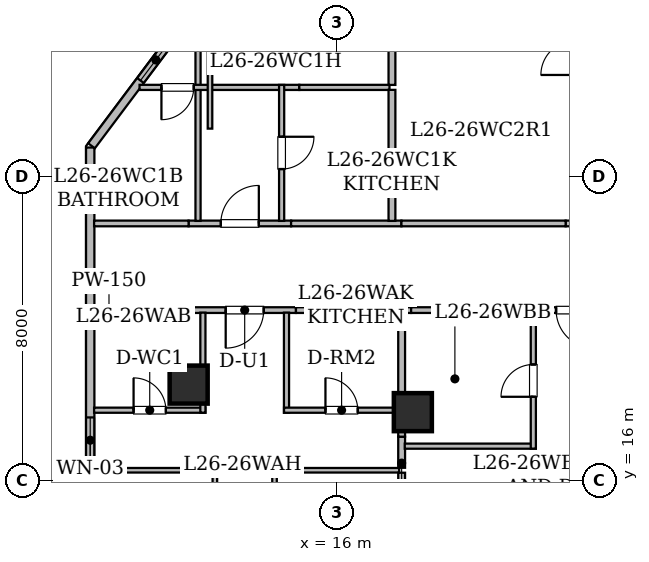
"""IFC4 building model, lengths in metres.
Left out: names, types, materials, properties, quantities, classifications, styles, units other than length and angle.
Written with IfcOpenShell. Run it as: python <this file> out.ifc"""

import sys

from ifc_helpers import new_model, si_unit, direction, frame, frame_2d, origin, origin_2d, place, context, subcontext, project, spatial, rectangle, hollow_rectangle, extrude, element, fill, save


model = new_model("IFC4")
c1 = context("Model", 3, precision=1e-05, world=origin(), true_north=direction((0.0, 1.0)))
c2 = subcontext(c1, "Body", "Model", "MODEL_VIEW")
j1 = project(units=[si_unit("LENGTHUNIT", "METRE"), si_unit("PLANEANGLEUNIT", "RADIAN")], contexts=[c1])
p1 = place(None, origin())
s1 = spatial("IfcSite", under=j1, at=p1, CompositionType="ELEMENT")
p2 = place(p1, origin())
s2 = spatial("IfcBuilding", under=s1, at=p2, CompositionType="ELEMENT")
p3 = place(p2, frame((0.0, 0.0, 105.55)))
s3 = spatial("IfcBuildingStorey", under=s2, at=p3, CompositionType="ELEMENT", Elevation=105.55)
for number, where, z_axis, x_axis in (
    (1, (12.1, 18.525, 0.0), (0.0, 0.0, 1.0), (1.0, 0.0, 0.0)),
    (2, (18.0, 17.8, 0.0), (0.0, 0.0, 1.0), (1.0, 0.0, 0.0)),
):
    element("IfcColumn", number, at=place(p3, frame(where, z_axis=z_axis, x_axis=x_axis)), inside=s3, PredefinedType="COLUMN", context=c2, shape_type="SweptSolid", body=[
        extrude(hollow_rectangle(XDim=1.0, YDim=1.0, WallThickness=0.05, at=origin_2d()), origin(), (0.0, 0.0, 1.0), 3.65),
    ])
p4 = place(p3, frame((9.51, 10.717, 0.0), z_axis=(0.0, 0.0, 1.0), x_axis=(0.0, 1.0, 0.0)))
e3 = element("IfcWall", 3, at=p4, inside=s3, PredefinedType="STANDARD", context=c2, shape_type="SweptSolid", body=[
    extrude(rectangle(XDim=14.046, YDim=0.22, at=frame_2d((7.023, 0.0))), origin(), (0.0, 0.0, 1.0), 3.43),
])
p5 = place(p4, frame((5.744, 0.0, 0.8)))
e4 = element("IfcOpeningElement", 4, at=p5, cuts=e3, PredefinedType="OPENING", context=c2, shape_type="SweptSolid", body=[
    extrude(rectangle(XDim=1.2, YDim=1.5, at=frame_2d((0.6, 0.75))), frame((0.0, 0.12, 0.0), z_axis=(0.0, -1.0, 0.0), x_axis=(1.0, 0.0, 0.0)), (0.0, 0.0, 1.0), 0.24),
])
p6 = place(p4, frame((2.345, 0.0, 0.85)))
e5 = element("IfcOpeningElement", 5, at=p6, cuts=e3, PredefinedType="OPENING", context=c2, shape_type="SweptSolid", body=[
    extrude(rectangle(XDim=1.65, YDim=1.55, at=frame_2d((0.825, 0.775))), frame((0.0, 0.12, 0.0), z_axis=(0.0, -1.0, 0.0), x_axis=(1.0, 0.0, 0.0)), (0.0, 0.0, 1.0), 0.24),
])
p7 = place(p3, frame((9.544, 24.808, 0.0), z_axis=(0.0, 0.0, 1.0), x_axis=(0.600019580308, 0.799985314394, 0.0)))
e6 = element("IfcWall", 6, at=p7, inside=s3, PredefinedType="STANDARD", context=c2, shape_type="SweptSolid", body=[
    extrude(rectangle(XDim=3.99, YDim=0.22, at=frame_2d((1.995, 0.0))), origin(), (0.0, 0.0, 1.0), 3.43),
])
p8 = place(p7, frame((2.147, 0.0, 0.85)))
e7 = element("IfcOpeningElement", 7, at=p8, cuts=e6, PredefinedType="OPENING", context=c2, shape_type="SweptSolid", body=[
    extrude(rectangle(XDim=1.35, YDim=1.5, at=frame_2d((0.675, 0.75))), frame((0.0, 0.12, 0.0), z_axis=(0.0, -1.0, 0.0), x_axis=(1.0, 0.0, 0.0)), (0.0, 0.0, 1.0), 0.24),
])
p9 = place(p3, frame((14.924, 20.485, 0.0), z_axis=(0.0, 0.0, 1.0), x_axis=(-1.0, 0.0, 0.0)))
e8 = element("IfcWall", 8, at=p9, inside=s3, PredefinedType="STANDARD", context=c2, shape_type="SweptSolid", body=[
    extrude(rectangle(XDim=2.698, YDim=0.15, at=frame_2d((1.349, 0.0))), origin(), (0.0, 0.0, 1.0), 3.43),
])
p10 = place(p9, frame((0.849, 0.0, 0.0)))
e9 = element("IfcOpeningElement", 9, at=p10, cuts=e8, PredefinedType="OPENING", context=c2, shape_type="SweptSolid", body=[
    extrude(rectangle(XDim=1.0, YDim=2.15, at=frame_2d((0.5, 1.075))), frame((0.0, 0.085, 0.0), z_axis=(0.0, -1.0, 0.0), x_axis=(1.0, 0.0, 0.0)), (0.0, 0.0, 1.0), 0.17),
])
p11 = place(p3, frame((12.226, 20.485, 0.0), z_axis=(0.0, 0.0, 1.0), x_axis=(-1.0, 0.0, 0.0)))
e10 = element("IfcWall", 10, at=p11, inside=s3, PredefinedType="STANDARD", context=c2, shape_type="SweptSolid", body=[
    extrude(rectangle(XDim=2.614, YDim=0.15, at=frame_2d((1.307, 0.0))), origin(), (0.0, 0.0, 1.0), 2.876),
])
p12 = place(p3, frame((17.954, 20.485, 0.0), z_axis=(0.0, 0.0, 1.0), x_axis=(-1.0, 0.0, 0.0)))
e11 = element("IfcWall", 11, at=p12, inside=s3, PredefinedType="STANDARD", context=c2, shape_type="SweptSolid", body=[
    extrude(rectangle(XDim=3.03, YDim=0.15, at=frame_2d((1.515, 0.0))), origin(), (0.0, 0.0, 1.0), 2.647),
])
p13 = place(p3, frame((23.619, 20.485, 0.0), z_axis=(0.0, 0.0, 1.0), x_axis=(-1.0, 0.0, 0.0)))
e12 = element("IfcWall", 12, at=p13, inside=s3, PredefinedType="STANDARD", context=c2, shape_type="SweptSolid", body=[
    extrude(rectangle(XDim=2.698, YDim=0.15, at=frame_2d((1.349, 0.0))), origin(), (0.0, 0.0, 1.0), 3.43),
])
p14 = place(p13, frame((0.849, 0.0, 0.0)))
e13 = element("IfcOpeningElement", 13, at=p14, cuts=e12, PredefinedType="OPENING", context=c2, shape_type="SweptSolid", body=[
    extrude(rectangle(XDim=1.0, YDim=2.15, at=frame_2d((0.5, 1.075))), frame((0.0, 0.085, 0.0), z_axis=(0.0, -1.0, 0.0), x_axis=(1.0, 0.0, 0.0)), (0.0, 0.0, 1.0), 0.17),
])
p15 = place(p3, frame((20.921, 20.485, 0.0), z_axis=(0.0, 0.0, 1.0), x_axis=(-1.0, 0.0, 0.0)))
e14 = element("IfcWall", 14, at=p15, inside=s3, PredefinedType="STANDARD", context=c2, shape_type="SweptSolid", body=[
    extrude(rectangle(XDim=2.967, YDim=0.15, at=frame_2d((1.483, 0.0))), origin(), (0.0, 0.0, 1.0), 2.647),
])
p16 = place(p3, frame((12.098, 22.765, 0.0), z_axis=(0.0, 0.0, 1.0), x_axis=(1.0, 0.0, 0.0)))
e15 = element("IfcWall", 15, at=p16, inside=s3, PredefinedType="STANDARD", context=c2, shape_type="SweptSolid", body=[
    extrude(rectangle(XDim=2.698, YDim=0.15, at=frame_2d((1.349, 0.0))), origin(), (0.0, 0.0, 1.0), 2.876),
])
p17 = place(p16, frame((0.849, 0.0, 0.0)))
e16 = element("IfcOpeningElement", 16, at=p17, cuts=e15, PredefinedType="OPENING", context=c2, shape_type="SweptSolid", body=[
    extrude(rectangle(XDim=1.0, YDim=2.15, at=frame_2d((0.5, 1.075))), frame((0.0, 0.085, 0.0), z_axis=(0.0, -1.0, 0.0), x_axis=(1.0, 0.0, 0.0)), (0.0, 0.0, 1.0), 0.17),
])
p18 = place(p3, frame((9.612, 22.765, 0.0), z_axis=(0.0, 0.0, 1.0), x_axis=(1.0, 0.0, 0.0)))
e17 = element("IfcWall", 17, at=p18, inside=s3, PredefinedType="STANDARD", context=c2, shape_type="SweptSolid", body=[
    extrude(rectangle(XDim=2.486, YDim=0.15, at=frame_2d((1.243, 0.0))), origin(), (0.0, 0.0, 1.0), 2.876),
])
p19 = place(p3, frame((14.796, 22.765, 0.0), z_axis=(0.0, 0.0, 1.0), x_axis=(1.0, 0.0, 0.0)))
e18 = element("IfcWall", 18, at=p19, inside=s3, PredefinedType="STANDARD", context=c2, shape_type="SweptSolid", body=[
    extrude(rectangle(XDim=2.903, YDim=0.15, at=frame_2d((1.452, 0.0))), origin(), (0.0, 0.0, 1.0), 3.43),
])
p20 = place(p3, frame((22.02, 22.765, 0.0), z_axis=(0.0, 0.0, 1.0), x_axis=(1.0, 0.0, 0.0)))
e19 = element("IfcWall", 19, at=p20, inside=s3, PredefinedType="STANDARD", context=c2, shape_type="SweptSolid", body=[
    extrude(rectangle(XDim=2.078, YDim=0.15, at=frame_2d((1.039, 0.0))), origin(), (0.0, 0.0, 1.0), 3.43),
])
p21 = place(p3, frame((17.699, 22.765, 0.0), z_axis=(0.0, 0.0, 1.0), x_axis=(1.0, 0.0, 0.0)))
e20 = element("IfcWall", 20, at=p21, inside=s3, PredefinedType="STANDARD", context=c2, shape_type="SweptSolid", body=[
    extrude(rectangle(XDim=4.321, YDim=0.15, at=frame_2d((2.161, 0.0))), origin(), (0.0, 0.0, 1.0), 2.647),
])
p22 = place(p3, frame((9.612, 17.851, 0.0), z_axis=(0.0, 0.0, 1.0), x_axis=(1.0, 0.0, 0.0)))
e21 = element("IfcWall", 21, at=p22, inside=s3, PredefinedType="PARTITIONING", context=c2, shape_type="SweptSolid", body=[
    extrude(rectangle(XDim=2.928, YDim=0.135, at=frame_2d((1.464, 0.0))), origin(), (0.0, 0.0, 1.0), 2.876),
])
p23 = place(p22, frame((1.039, 0.0, 0.0)))
e22 = element("IfcOpeningElement", 22, at=p23, cuts=e21, PredefinedType="OPENING", context=c2, shape_type="SweptSolid", body=[
    extrude(rectangle(XDim=0.85, YDim=2.1, at=frame_2d((0.425, 1.05))), frame((0.0, 0.077, 0.0), z_axis=(0.0, -1.0, 0.0), x_axis=(1.0, 0.0, 0.0)), (0.0, 0.0, 1.0), 0.155),
])
for number, where, z_axis, x_axis in (
    (23, (12.475, 17.786, 0.0), (0.0, 0.0, 1.0), (0.0, 1.0, 0.0)),
    (24, (14.675, 20.418, 0.0), (0.0, 0.0, 1.0), (0.0, -1.0, 0.0)),
):
    element("IfcWall", number, at=place(p3, frame(where, z_axis=z_axis, x_axis=x_axis)), inside=s3, PredefinedType="PARTITIONING", context=c2, shape_type="SweptSolid", body=[
        extrude(rectangle(XDim=2.632, YDim=0.135, at=frame_2d((1.316, 0.0))), origin(), (0.0, 0.0, 1.0), 2.647),
    ])
p24 = place(p3, frame((14.61, 17.851, 0.0), z_axis=(0.0, 0.0, 1.0), x_axis=(1.0, 0.0, 0.0)))
e25 = element("IfcWall", 25, at=p24, inside=s3, PredefinedType="PARTITIONING", context=c2, shape_type="SweptSolid", body=[
    extrude(rectangle(XDim=3.03, YDim=0.135, at=frame_2d((1.515, 0.0))), origin(), (0.0, 0.0, 1.0), 2.647),
])
p25 = place(p24, frame((1.09, 0.0, 0.0)))
e26 = element("IfcOpeningElement", 26, at=p25, cuts=e25, PredefinedType="OPENING", context=c2, shape_type="SweptSolid", body=[
    extrude(rectangle(XDim=0.85, YDim=2.1, at=frame_2d((0.425, 1.05))), frame((0.0, 0.077, 0.0), z_axis=(0.0, -1.0, 0.0), x_axis=(1.0, 0.0, 0.0)), (0.0, 0.0, 1.0), 0.155),
])
p26 = place(p3, frame((12.79, 7.357, 0.0), z_axis=(0.0, 0.0, 1.0), x_axis=(0.0, 1.0, 0.0)))
e27 = element("IfcWall", 27, at=p26, inside=s3, PredefinedType="PARTITIONING", context=c2, shape_type="SweptSolid", body=[
    extrude(rectangle(XDim=8.979, YDim=0.12, at=frame_2d((4.49, 0.0))), origin(), (0.0, 0.0, 1.0), 2.876),
])
p27 = place(p26, frame((4.039, 0.0, 0.0)))
e28 = element("IfcOpeningElement", 28, at=p27, cuts=e27, PredefinedType="OPENING", context=c2, shape_type="SweptSolid", body=[
    extrude(rectangle(XDim=0.9, YDim=2.1, at=frame_2d((0.45, 1.05))), frame((0.0, 0.07, 0.0), z_axis=(0.0, -1.0, 0.0), x_axis=(1.0, 0.0, 0.0)), (0.0, 0.0, 1.0), 0.14),
])
p28 = place(p3, frame((12.855, 16.271, 0.0), z_axis=(0.0, 0.0, 1.0), x_axis=(-1.0, 0.0, 0.0)))
e29 = element("IfcWall", 29, at=p28, inside=s3, PredefinedType="PARTITIONING", context=c2, shape_type="SweptSolid", body=[
    extrude(rectangle(XDim=3.243, YDim=0.12, at=frame_2d((1.622, 0.0))), origin(), (0.0, 0.0, 1.0), 3.43),
])
p29 = place(p3, frame((14.36, 16.336, 0.0), z_axis=(0.0, 0.0, 1.0), x_axis=(0.0, -1.0, 0.0)))
e30 = element("IfcWall", 30, at=p29, inside=s3, PredefinedType="PARTITIONING", context=c2, shape_type="SweptSolid", body=[
    extrude(rectangle(XDim=9.724, YDim=0.12, at=frame_2d((4.862, 0.0))), origin(), (0.0, 0.0, 1.0), 2.876),
])
p30 = place(p29, frame((4.412, 0.0, 0.0)))
e31 = element("IfcOpeningElement", 31, at=p30, cuts=e30, PredefinedType="OPENING", context=c2, shape_type="SweptSolid", body=[
    extrude(rectangle(XDim=0.9, YDim=2.1, at=frame_2d((0.45, 1.05))), frame((0.0, 0.07, 0.0), z_axis=(0.0, -1.0, 0.0), x_axis=(1.0, 0.0, 0.0)), (0.0, 0.0, 1.0), 0.14),
])
p31 = place(p3, frame((17.64, 16.271, 0.0), z_axis=(0.0, 0.0, 1.0), x_axis=(-1.0, 0.0, 0.0)))
e32 = element("IfcWall", 32, at=p31, inside=s3, PredefinedType="PARTITIONING", context=c2, shape_type="SweptSolid", body=[
    extrude(rectangle(XDim=3.345, YDim=0.12, at=frame_2d((1.672, 0.0))), origin(), (0.0, 0.0, 1.0), 2.647),
])
p32 = place(p3, frame((17.705, 17.154, 0.0), z_axis=(0.0, 0.0, 1.0), x_axis=(0.0, -1.0, 0.0)))
e33 = element("IfcWall", 33, at=p32, inside=s3, PredefinedType="STANDARD", context=c2, shape_type="SweptSolid", body=[
    extrude(rectangle(XDim=0.818, YDim=0.18, at=frame_2d((0.409, 0.0))), origin(), (0.0, 0.0, 1.0), 2.647),
])
p33 = place(p3, frame((17.705, 17.786, 0.0), z_axis=(0.0, 0.0, 1.0), x_axis=(0.0, -1.0, 0.0)))
e34 = element("IfcWall", 34, at=p33, inside=s3, PredefinedType="STANDARD", context=c2, shape_type="SweptSolid", body=[
    extrude(rectangle(XDim=0.632, YDim=0.18, at=frame_2d((0.316, 0.0))), origin(), (0.0, 0.0, 1.0), 2.647),
])
p34 = place(p3, frame((17.705, 20.418, 0.0), z_axis=(0.0, 0.0, 1.0), x_axis=(0.0, -1.0, 0.0)))
e35 = element("IfcWall", 35, at=p34, inside=s3, PredefinedType="STANDARD", context=c2, shape_type="SweptSolid", body=[
    extrude(rectangle(XDim=2.502, YDim=0.18, at=frame_2d((1.251, 0.0))), origin(), (0.0, 0.0, 1.0), 2.647),
])
p35 = place(p3, frame((17.705, 16.206, 0.0), z_axis=(0.0, 0.0, 1.0), x_axis=(0.0, -1.0, 0.0)))
e36 = element("IfcWall", 36, at=p35, inside=s3, PredefinedType="STANDARD", context=c2, shape_type="SweptSolid", body=[
    extrude(rectangle(XDim=1.13, YDim=0.18, at=frame_2d((0.565, 0.0))), origin(), (0.0, 0.0, 1.0), 2.647),
])
p36 = place(p3, frame((17.787, 16.905, 0.0), z_axis=(0.0, 0.0, 1.0), x_axis=(1.0, 0.0, 0.0)))
e37 = element("IfcWall", 37, at=p36, inside=s3, PredefinedType="PARTITIONING", context=c2, shape_type="SweptSolid", body=[
    extrude(rectangle(XDim=3.448, YDim=0.135, at=frame_2d((1.724, 0.0))), origin(), (0.0, 0.0, 1.0), 2.647),
])
p37 = place(p3, frame((21.17, 16.84, 0.0), z_axis=(0.0, 0.0, 1.0), x_axis=(0.0, 1.0, 0.0)))
e38 = element("IfcWall", 38, at=p37, inside=s3, PredefinedType="PARTITIONING", context=c2, shape_type="SweptSolid", body=[
    extrude(rectangle(XDim=3.578, YDim=0.135, at=frame_2d((1.789, 0.0))), origin(), (0.0, 0.0, 1.0), 2.647),
])
p38 = place(p37, frame((1.364, 0.0, 0.0)))
e39 = element("IfcOpeningElement", 39, at=p38, cuts=e38, PredefinedType="OPENING", context=c2, shape_type="SweptSolid", body=[
    extrude(rectangle(XDim=0.85, YDim=2.1, at=frame_2d((0.425, 1.05))), frame((0.0, 0.077, 0.0), z_axis=(0.0, -1.0, 0.0), x_axis=(1.0, 0.0, 0.0)), (0.0, 0.0, 1.0), 0.155),
])
p39 = place(p3, frame((12.347, 22.832, 0.0), z_axis=(0.0, 0.0, 1.0), x_axis=(0.0, 1.0, 0.0)))
e40 = element("IfcWall", 40, at=p39, inside=s3, PredefinedType="PARTITIONING", context=c2, shape_type="SweptSolid", body=[
    extrude(rectangle(XDim=6.178, YDim=0.135, at=frame_2d((3.089, 0.0))), origin(), (0.0, 0.0, 1.0), 2.876),
])
p40 = place(p3, frame((15.012, 26.345, 0.0), z_axis=(0.0, 0.0, 1.0), x_axis=(-1.0, 0.0, 0.0)))
e41 = element("IfcWall", 41, at=p40, inside=s3, PredefinedType="PARTITIONING", context=c2, shape_type="SweptSolid", body=[
    extrude(rectangle(XDim=4.204, YDim=0.135, at=frame_2d((2.102, 0.0))), origin(), (0.0, 0.0, 1.0), 2.876),
])
p41 = place(p40, frame((2.778, 0.0, 0.0)))
e42 = element("IfcOpeningElement", 42, at=p41, cuts=e41, PredefinedType="OPENING", context=c2, shape_type="SweptSolid", body=[
    extrude(rectangle(XDim=0.85, YDim=2.1, at=frame_2d((0.425, 1.05))), frame((0.0, 0.077, 0.0), z_axis=(0.0, -1.0, 0.0), x_axis=(1.0, 0.0, 0.0)), (0.0, 0.0, 1.0), 0.155),
])
p42 = place(p3, frame((17.385, 26.345, 0.0), z_axis=(0.0, 0.0, 1.0), x_axis=(-1.0, 0.0, 0.0)))
e43 = element("IfcWall", 43, at=p42, inside=s3, PredefinedType="PARTITIONING", context=c2, shape_type="SweptSolid", body=[
    extrude(rectangle(XDim=2.373, YDim=0.135, at=frame_2d((1.187, 0.0))), origin(), (0.0, 0.0, 1.0), 3.43),
])
p43 = place(p3, frame((14.547, 26.41, 0.0), z_axis=(0.0, 0.0, 1.0), x_axis=(0.0, -1.0, 0.0)))
e44 = element("IfcWall", 44, at=p43, inside=s3, PredefinedType="PARTITIONING", context=c2, shape_type="SweptSolid", body=[
    extrude(rectangle(XDim=3.578, YDim=0.135, at=frame_2d((1.789, 0.0))), origin(), (0.0, 0.0, 1.0), 3.43),
])
p44 = place(p43, frame((1.364, 0.0, 0.0)))
e45 = element("IfcOpeningElement", 45, at=p44, cuts=e44, PredefinedType="OPENING", context=c2, shape_type="SweptSolid", body=[
    extrude(rectangle(XDim=0.85, YDim=2.1, at=frame_2d((0.425, 1.05))), frame((0.0, 0.077, 0.0), z_axis=(0.0, -1.0, 0.0), x_axis=(1.0, 0.0, 0.0)), (0.0, 0.0, 1.0), 0.155),
])
p45 = place(p3, frame((12.662, 25.26, 0.0), z_axis=(0.0, 0.0, 1.0), x_axis=(0.0, 1.0, 0.0)))
e46 = element("IfcWall", 46, at=p45, inside=s3, PredefinedType="PARTITIONING", context=c2, shape_type="SweptSolid", body=[
    extrude(rectangle(XDim=10.162, YDim=0.12, at=frame_2d((5.081, 0.0))), origin(), (0.0, 0.0, 1.0), 3.43),
])
p46 = place(p45, frame((5.839, 0.0, 0.0)))
e47 = element("IfcOpeningElement", 47, at=p46, cuts=e46, PredefinedType="OPENING", context=c2, shape_type="SweptSolid", body=[
    extrude(rectangle(XDim=0.9, YDim=2.1, at=frame_2d((0.45, 1.05))), frame((0.0, 0.07, 0.0), z_axis=(0.0, -1.0, 0.0), x_axis=(1.0, 0.0, 0.0)), (0.0, 0.0, 1.0), 0.14),
])
p47 = place(p3, frame((17.45, 27.86, 0.0), z_axis=(0.0, 0.0, 1.0), x_axis=(0.0, -1.0, 0.0)))
e48 = element("IfcWall", 48, at=p47, inside=s3, PredefinedType="STANDARD", context=c2, shape_type="SweptSolid", body=[
    extrude(rectangle(XDim=1.45, YDim=0.18, at=frame_2d((0.725, 0.0))), origin(), (0.0, 0.0, 1.0), 3.43),
])
p48 = place(p3, frame((17.45, 26.28, 0.0), z_axis=(0.0, 0.0, 1.0), x_axis=(0.0, -1.0, 0.0)))
e49 = element("IfcWall", 49, at=p48, inside=s3, PredefinedType="STANDARD", context=c2, shape_type="SweptSolid", body=[
    extrude(rectangle(XDim=3.448, YDim=0.18, at=frame_2d((1.724, 0.0))), origin(), (0.0, 0.0, 1.0), 3.43),
])
p49 = place(p5, origin())
e50 = element("IfcWindow", 50, at=p49, inside=s3, PartitioningType="SINGLE_PANEL", PredefinedType="WINDOW", context=c2, shape_type="SweptSolid", body=[
    extrude(rectangle(XDim=1.2, YDim=1.5, at=frame_2d((0.6, 0.75))), frame((0.0, 0.03, 0.0), z_axis=(0.0, -1.0, 0.0), x_axis=(1.0, 0.0, 0.0)), (0.0, 0.0, 1.0), 0.06),
])
fill(e4, e50)
p50 = place(p8, origin())
e51 = element("IfcWindow", 51, at=p50, inside=s3, PartitioningType="SINGLE_PANEL", PredefinedType="WINDOW", context=c2, shape_type="SweptSolid", body=[
    extrude(rectangle(XDim=1.35, YDim=1.5, at=frame_2d((0.675, 0.75))), frame((0.0, 0.03, 0.0), z_axis=(0.0, -1.0, 0.0), x_axis=(1.0, 0.0, 0.0)), (0.0, 0.0, 1.0), 0.06),
])
fill(e7, e51)
p51 = place(p10, origin())
e52 = element("IfcDoor", 52, at=p51, inside=s3, OperationType="SINGLE_SWING_RIGHT", PredefinedType="DOOR", context=c2, shape_type="SweptSolid", body=[
    extrude(rectangle(XDim=1.0, YDim=2.15, at=frame_2d((0.5, 1.075))), frame((0.0, 0.025, 0.0), z_axis=(0.0, -1.0, 0.0), x_axis=(1.0, 0.0, 0.0)), (0.0, 0.0, 1.0), 0.05),
])
fill(e9, e52)
p52 = place(p14, origin())
e53 = element("IfcDoor", 53, at=p52, inside=s3, OperationType="SINGLE_SWING_LEFT", PredefinedType="DOOR", context=c2, shape_type="SweptSolid", body=[
    extrude(rectangle(XDim=1.0, YDim=2.15, at=frame_2d((0.5, 1.075))), frame((0.0, 0.025, 0.0), z_axis=(0.0, -1.0, 0.0), x_axis=(1.0, 0.0, 0.0)), (0.0, 0.0, 1.0), 0.05),
])
fill(e13, e53)
p53 = place(p17, origin())
e54 = element("IfcDoor", 54, at=p53, inside=s3, OperationType="SINGLE_SWING_RIGHT", PredefinedType="DOOR", context=c2, shape_type="SweptSolid", body=[
    extrude(rectangle(XDim=1.0, YDim=2.15, at=frame_2d((0.5, 1.075))), frame((0.0, 0.025, 0.0), z_axis=(0.0, -1.0, 0.0), x_axis=(1.0, 0.0, 0.0)), (0.0, 0.0, 1.0), 0.05),
])
fill(e16, e54)
p54 = place(p23, origin())
e55 = element("IfcDoor", 55, at=p54, inside=s3, OperationType="SINGLE_SWING_LEFT", PredefinedType="DOOR", context=c2, shape_type="SweptSolid", body=[
    extrude(rectangle(XDim=0.85, YDim=2.1, at=frame_2d((0.425, 1.05))), frame((0.0, 0.025, 0.0), z_axis=(0.0, -1.0, 0.0), x_axis=(1.0, 0.0, 0.0)), (0.0, 0.0, 1.0), 0.05),
])
fill(e22, e55)
p55 = place(p25, origin())
e56 = element("IfcDoor", 56, at=p55, inside=s3, OperationType="SINGLE_SWING_LEFT", PredefinedType="DOOR", context=c2, shape_type="SweptSolid", body=[
    extrude(rectangle(XDim=0.85, YDim=2.1, at=frame_2d((0.425, 1.05))), frame((0.0, 0.025, 0.0), z_axis=(0.0, -1.0, 0.0), x_axis=(1.0, 0.0, 0.0)), (0.0, 0.0, 1.0), 0.05),
])
fill(e26, e56)
p56 = place(p38, origin())
e57 = element("IfcDoor", 57, at=p56, inside=s3, OperationType="SINGLE_SWING_LEFT", PredefinedType="DOOR", context=c2, shape_type="SweptSolid", body=[
    extrude(rectangle(XDim=0.85, YDim=2.1, at=frame_2d((0.425, 1.05))), frame((0.0, 0.025, 0.0), z_axis=(0.0, -1.0, 0.0), x_axis=(1.0, 0.0, 0.0)), (0.0, 0.0, 1.0), 0.05),
])
fill(e39, e57)
p57 = place(p41, origin())
e58 = element("IfcDoor", 58, at=p57, inside=s3, OperationType="SINGLE_SWING_RIGHT", PredefinedType="DOOR", context=c2, shape_type="SweptSolid", body=[
    extrude(rectangle(XDim=0.85, YDim=2.1, at=frame_2d((0.425, 1.05))), frame((0.0, 0.025, 0.0), z_axis=(0.0, -1.0, 0.0), x_axis=(1.0, 0.0, 0.0)), (0.0, 0.0, 1.0), 0.05),
])
fill(e42, e58)
p58 = place(p44, origin())
e59 = element("IfcDoor", 59, at=p58, inside=s3, OperationType="SINGLE_SWING_LEFT", PredefinedType="DOOR", context=c2, shape_type="SweptSolid", body=[
    extrude(rectangle(XDim=0.85, YDim=2.1, at=frame_2d((0.425, 1.05))), frame((0.0, 0.025, 0.0), z_axis=(0.0, -1.0, 0.0), x_axis=(1.0, 0.0, 0.0)), (0.0, 0.0, 1.0), 0.05),
])
fill(e45, e59)
save(model, sys.argv[1])
